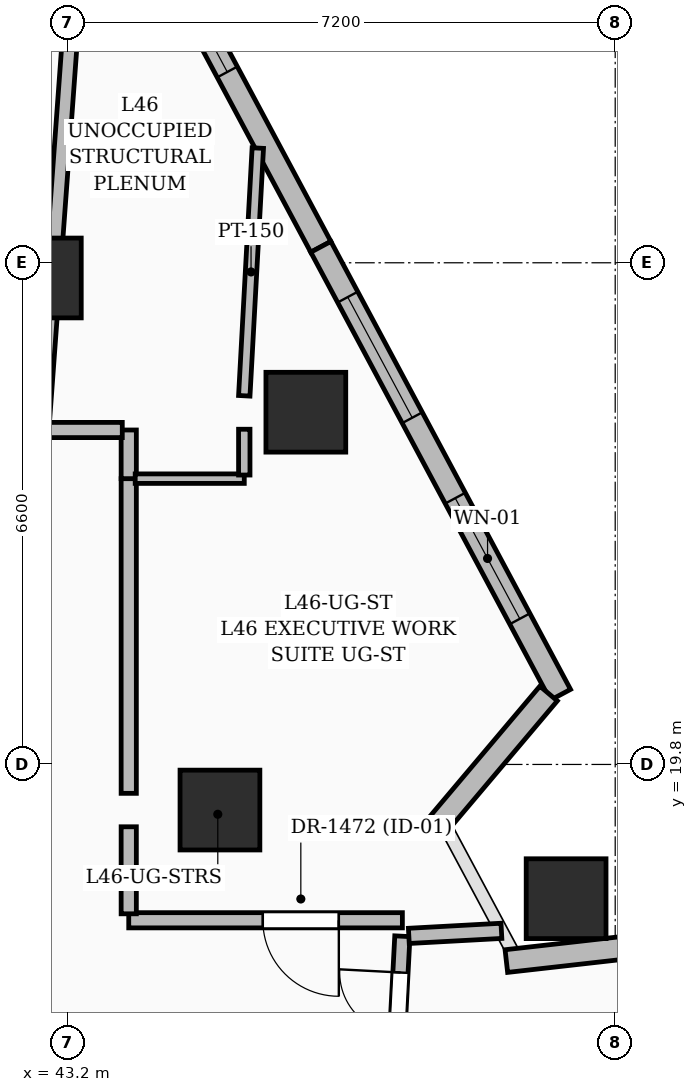
"""IFC4 building model, lengths in metres.
Left out: names, types, materials, properties, quantities, classifications, styles, units other than length and angle.
Written with IfcOpenShell. Run it as: python <this file> out.ifc"""

import sys

from ifc_helpers import new_model, si_unit, direction, frame, frame_2d, origin, origin_2d, place, context, subcontext, project, spatial, rectangle, extrude, element, fill, save


model = new_model("IFC4")
c1 = context("Model", 3, precision=1e-05, world=origin(), true_north=direction((0.0, 1.0)))
c2 = subcontext(c1, "Body", "Model", "MODEL_VIEW")
j1 = project(units=[si_unit("LENGTHUNIT", "METRE"), si_unit("PLANEANGLEUNIT", "RADIAN")], contexts=[c1])
p1 = place(None, origin())
s1 = spatial("IfcSite", under=j1, at=p1, CompositionType="ELEMENT")
p2 = place(p1, origin())
s2 = spatial("IfcBuilding", under=s1, at=p2, CompositionType="ELEMENT")
p3 = place(p2, frame((0.0, 0.0, 178.8)))
s3 = spatial("IfcBuildingStorey", under=s2, at=p3, CompositionType="ELEMENT", Elevation=178.8)
for number, where, z_axis, x_axis in (
    (1, (45.2, 19.2, 0.0), (0.0, 0.0, 1.0), (1.0, 0.0, 0.0)),
    (2, (42.85, 26.2, 0.0), (0.0, 0.0, 1.0), (1.0, 0.0, 0.0)),
    (3, (49.754, 18.034, 0.0), (0.0, 0.0, 1.0), (1.0, 0.0, 0.0)),
    (4, (46.33, 24.434, 0.0), (0.0, 0.0, 1.0), (1.0, 0.0, 0.0)),
):
    element("IfcColumn", number, at=place(p3, frame(where, z_axis=z_axis, x_axis=x_axis)), inside=s3, PredefinedType="COLUMN", context=c2, shape_type="SweptSolid", body=[
        extrude(rectangle(XDim=1.05, YDim=1.05, at=origin_2d()), origin(), (0.0, 0.0, 1.0), 3.6),
    ])
p4 = place(p3, frame((43.374, 32.503, 0.0), z_axis=(0.0, 0.0, 1.0), x_axis=(0.471750001728, -0.881732349338, 0.0)))
e5 = element("IfcWall", 5, at=p4, inside=s3, PredefinedType="SOLIDWALL", context=c2, shape_type="SweptSolid", body=[
    extrude(rectangle(XDim=6.684, YDim=0.3, at=frame_2d((3.342, 0.0))), origin(), (0.0, 0.0, 1.0), 3.35),
])
p5 = place(p4, frame((1.975, 0.0, 0.55)))
e6 = element("IfcOpeningElement", 6, at=p5, cuts=e5, PredefinedType="OPENING", context=c2, shape_type="SweptSolid", body=[
    extrude(rectangle(XDim=2.1, YDim=2.4, at=frame_2d((1.05, 1.2))), frame((0.0, 0.16, 0.0), z_axis=(0.0, -1.0, 0.0), x_axis=(1.0, 0.0, 0.0)), (0.0, 0.0, 1.0), 0.32),
])
p6 = place(p3, frame((46.527, 26.61, 0.0), z_axis=(0.0, 0.0, 1.0), x_axis=(0.471721602778, -0.881747542935, 0.0)))
e7 = element("IfcWall", 7, at=p6, inside=s3, PredefinedType="SOLIDWALL", context=c2, shape_type="SweptSolid", body=[
    extrude(rectangle(XDim=6.684, YDim=0.3, at=frame_2d((3.342, 0.0))), origin(), (0.0, 0.0, 1.0), 3.35),
])
p7 = place(p6, frame((3.75, 0.0, 0.6)))
e8 = element("IfcOpeningElement", 8, at=p7, cuts=e7, PredefinedType="OPENING", context=c2, shape_type="SweptSolid", body=[
    extrude(rectangle(XDim=1.8, YDim=2.1, at=frame_2d((0.9, 1.05))), frame((0.0, 0.16, 0.0), z_axis=(0.0, -1.0, 0.0), x_axis=(1.0, 0.0, 0.0)), (0.0, 0.0, 1.0), 0.32),
])
p8 = place(p6, frame((0.75, 0.0, 0.6)))
e9 = element("IfcOpeningElement", 9, at=p8, cuts=e7, PredefinedType="OPENING", context=c2, shape_type="SweptSolid", body=[
    extrude(rectangle(XDim=1.8, YDim=2.1, at=frame_2d((0.9, 1.05))), frame((0.0, 0.16, 0.0), z_axis=(0.0, -1.0, 0.0), x_axis=(1.0, 0.0, 0.0)), (0.0, 0.0, 1.0), 0.32),
])
p9 = place(p3, frame((49.524, 20.733, 0.0), z_axis=(0.0, 0.0, 1.0), x_axis=(-0.645152076947, -0.764054184996, 0.0)))
e10 = element("IfcWall", 10, at=p9, inside=s3, PredefinedType="SOLIDWALL", context=c2, shape_type="SweptSolid", body=[
    extrude(rectangle(XDim=2.314, YDim=0.3, at=frame_2d((1.157, 0.0))), origin(), (0.0, 0.0, 1.0), 2.575),
])
p10 = place(p3, frame((48.968, 17.213, 0.0), z_axis=(0.0, 0.0, 1.0), x_axis=(0.993674192695, 0.112301374752, 0.0)))
e11 = element("IfcWall", 11, at=p10, inside=s3, PredefinedType="SOLIDWALL", context=c2, shape_type="SweptSolid", body=[
    extrude(rectangle(XDim=2.594, YDim=0.3, at=frame_2d((1.297, 0.0))), origin(), (0.0, 0.0, 1.0), 2.469),
])
p11 = place(p3, frame((47.425, 14.2, 0.0), z_axis=(0.0, 0.0, 1.0), x_axis=(0.052336623882, 0.998629499765, 0.0)))
e12 = element("IfcWall", 12, at=p11, inside=s3, PredefinedType="PARTITIONING", context=c2, shape_type="SweptSolid", body=[
    extrude(rectangle(XDim=3.345, YDim=0.2, at=frame_2d((1.672, 0.0))), origin(), (0.0, 0.0, 1.0), 2.464),
])
p12 = place(p11, frame((1.267, 0.0, 0.0)))
e13 = element("IfcOpeningElement", 13, at=p12, cuts=e12, PredefinedType="OPENING", context=c2, shape_type="SweptSolid", body=[
    extrude(rectangle(XDim=1.6, YDim=2.3, at=frame_2d((0.8, 1.15))), frame((0.0, 0.11, 0.0), z_axis=(0.0, -1.0, 0.0), x_axis=(1.0, 0.0, 0.0)), (0.0, 0.0, 1.0), 0.22),
])
p13 = place(p3, frame((47.6, 17.75, 0.0), z_axis=(0.0, 0.0, 1.0), x_axis=(-1.0, 0.0, 0.0)))
e14 = element("IfcWall", 14, at=p13, inside=s3, PredefinedType="PARTITIONING", context=c2, shape_type="SweptSolid", body=[
    extrude(rectangle(XDim=3.6, YDim=0.2, at=frame_2d((1.8, 0.0))), origin(), (0.0, 0.0, 1.0), 2.436),
])
p14 = place(p13, frame((0.836, 0.0, 0.0)))
e15 = element("IfcOpeningElement", 15, at=p14, cuts=e14, PredefinedType="OPENING", context=c2, shape_type="SweptSolid", body=[
    extrude(rectangle(XDim=1.0, YDim=2.2, at=frame_2d((0.5, 1.1))), frame((0.0, 0.11, 0.0), z_axis=(0.0, -1.0, 0.0), x_axis=(1.0, 0.0, 0.0)), (0.0, 0.0, 1.0), 0.22),
])
p15 = place(p3, frame((44.0, 17.835, 0.0), z_axis=(0.0, 0.0, 1.0), x_axis=(0.0, 1.0, 0.0)))
e16 = element("IfcWall", 16, at=p15, inside=s3, PredefinedType="PARTITIONING", context=c2, shape_type="SweptSolid", body=[
    extrude(rectangle(XDim=1.145, YDim=0.2, at=frame_2d((0.573, 0.0))), origin(), (0.0, 0.0, 1.0), 3.35),
])
p16 = place(p3, frame((44.0, 19.42, 0.0), z_axis=(0.0, 0.0, 1.0), x_axis=(0.0, 1.0, 0.0)))
e17 = element("IfcWall", 17, at=p16, inside=s3, PredefinedType="PARTITIONING", context=c2, shape_type="SweptSolid", body=[
    extrude(rectangle(XDim=4.14, YDim=0.2, at=frame_2d((2.07, 0.0))), origin(), (0.0, 0.0, 1.0), 2.436),
])
p17 = place(p3, frame((44.0, 23.56, 0.0), z_axis=(0.0, 0.0, 1.0), x_axis=(0.0, 1.0, 0.0)))
e18 = element("IfcWall", 18, at=p17, inside=s3, PredefinedType="PARTITIONING", context=c2, shape_type="SweptSolid", body=[
    extrude(rectangle(XDim=0.64, YDim=0.2, at=frame_2d((0.32, 0.0))), origin(), (0.0, 0.0, 1.0), 2.436),
])
p18 = place(p3, frame((43.915, 24.2, 0.0), z_axis=(0.0, 0.0, 1.0), x_axis=(-1.0, 0.0, 0.0)))
e19 = element("IfcWall", 19, at=p18, inside=s3, PredefinedType="PARTITIONING", context=c2, shape_type="SweptSolid", body=[
    extrude(rectangle(XDim=1.065, YDim=0.2, at=frame_2d((0.532, 0.0))), origin(), (0.0, 0.0, 1.0), 2.436),
])
p19 = place(p3, frame((48.903, 17.611, 0.0), z_axis=(0.0, 0.0, 1.0), x_axis=(-0.998517685885, -0.054428218549, 0.0)))
e20 = element("IfcWall", 20, at=p19, inside=s3, PredefinedType="PARTITIONING", context=c2, shape_type="SweptSolid", body=[
    extrude(rectangle(XDim=1.22, YDim=0.2, at=frame_2d((0.61, 0.0))), origin(), (0.0, 0.0, 1.0), 3.35),
])
p20 = place(p3, frame((45.52, 23.56, 0.0), z_axis=(0.0, 0.0, 1.0), x_axis=(-1.0, 0.0, 0.0)))
e21 = element("IfcWall", 21, at=p20, inside=s3, PredefinedType="PARTITIONING", context=c2, shape_type="SweptSolid", body=[
    extrude(rectangle(XDim=1.435, YDim=0.125, at=frame_2d((0.718, 0.0))), origin(), (0.0, 0.0, 1.0), 2.911),
])
p21 = place(p3, frame((45.52, 24.21, 0.0), z_axis=(0.0, 0.0, 1.0), x_axis=(0.0, -1.0, 0.0)))
e22 = element("IfcWall", 22, at=p21, inside=s3, PredefinedType="PARTITIONING", context=c2, shape_type="SweptSolid", body=[
    extrude(rectangle(XDim=0.603, YDim=0.15, at=frame_2d((0.301, 0.0))), origin(), (0.0, 0.0, 1.0), 3.35),
])
p22 = place(p3, frame((45.698, 27.909, 0.0), z_axis=(0.0, 0.0, 1.0), x_axis=(-0.054529579852, -0.99851215562, 0.0)))
e23 = element("IfcWall", 23, at=p22, inside=s3, PredefinedType="PARTITIONING", context=c2, shape_type="SweptSolid", body=[
    extrude(rectangle(XDim=3.264, YDim=0.15, at=frame_2d((1.632, 0.0))), origin(), (0.0, 0.0, 1.0), 2.57),
])
p23 = place(p3, frame((43.425, 32.077, 0.0), z_axis=(0.0, 0.0, 1.0), x_axis=(-0.0728725349, -0.997341262386, 0.0)))
e24 = element("IfcWall", 24, at=p23, inside=s3, PredefinedType="PARTITIONING", context=c2, shape_type="SweptSolid", body=[
    extrude(rectangle(XDim=7.813, YDim=0.2, at=frame_2d((3.906, 0.0))), origin(), (0.0, 0.0, 1.0), 2.436),
])
p24 = place(p5, origin())
e25 = element("IfcWindow", 25, at=p24, inside=s3, PartitioningType="SINGLE_PANEL", PredefinedType="WINDOW", context=c2, shape_type="SweptSolid", body=[
    extrude(rectangle(XDim=2.1, YDim=2.4, at=frame_2d((1.05, 1.2))), frame((0.0, 0.03, 0.0), z_axis=(0.0, -1.0, 0.0), x_axis=(1.0, 0.0, 0.0)), (0.0, 0.0, 1.0), 0.06),
])
fill(e6, e25)
p25 = place(p7, origin())
e26 = element("IfcWindow", 26, at=p25, inside=s3, PartitioningType="SINGLE_PANEL", PredefinedType="WINDOW", context=c2, shape_type="SweptSolid", body=[
    extrude(rectangle(XDim=1.8, YDim=2.1, at=frame_2d((0.9, 1.05))), frame((0.0, 0.03, 0.0), z_axis=(0.0, -1.0, 0.0), x_axis=(1.0, 0.0, 0.0)), (0.0, 0.0, 1.0), 0.06),
])
fill(e8, e26)
p26 = place(p8, origin())
e27 = element("IfcWindow", 27, at=p26, inside=s3, PartitioningType="SINGLE_PANEL", PredefinedType="WINDOW", context=c2, shape_type="SweptSolid", body=[
    extrude(rectangle(XDim=1.8, YDim=2.1, at=frame_2d((0.9, 1.05))), frame((0.0, 0.03, 0.0), z_axis=(0.0, -1.0, 0.0), x_axis=(1.0, 0.0, 0.0)), (0.0, 0.0, 1.0), 0.06),
])
fill(e9, e27)
p27 = place(p12, origin())
e28 = element("IfcDoor", 28, at=p27, inside=s3, OperationType="DOUBLE_DOOR_SINGLE_SWING", PredefinedType="DOOR", context=c2, shape_type="SweptSolid", body=[
    extrude(rectangle(XDim=1.6, YDim=2.3, at=frame_2d((0.8, 1.15))), frame((0.0, 0.025, 0.0), z_axis=(0.0, -1.0, 0.0), x_axis=(1.0, 0.0, 0.0)), (0.0, 0.0, 1.0), 0.05),
])
fill(e13, e28)
p28 = place(p14, origin())
e29 = element("IfcDoor", 29, at=p28, inside=s3, OperationType="SINGLE_SWING_LEFT", PredefinedType="DOOR", context=c2, shape_type="SweptSolid", body=[
    extrude(rectangle(XDim=1.0, YDim=2.2, at=frame_2d((0.5, 1.1))), frame((0.0, 0.025, 0.0), z_axis=(0.0, -1.0, 0.0), x_axis=(1.0, 0.0, 0.0)), (0.0, 0.0, 1.0), 0.05),
])
fill(e15, e29)
save(model, sys.argv[1])
